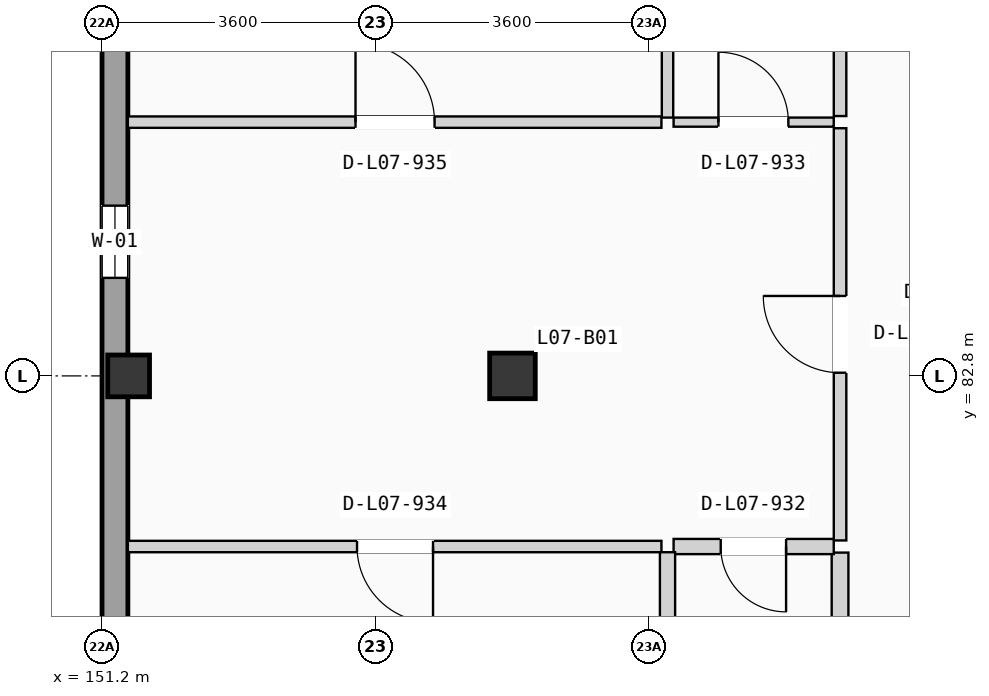
"""IFC4 building model, lengths in metres.
Left out: names, types, materials, properties, quantities, classifications, styles, units other than length and angle.
Written with IfcOpenShell. Run it as: python <this file> out.ifc"""

import sys

from ifc_helpers import new_model, si_unit, direction, frame, frame_2d, origin, origin_2d, place, context, subcontext, project, spatial, rectangle, extrude, element, fill, save


model = new_model("IFC4")
c1 = context("Model", 3, precision=1e-05, world=origin(), true_north=direction((0.0, 1.0)))
c2 = subcontext(c1, "Body", "Model", "MODEL_VIEW")
j1 = project(units=[si_unit("LENGTHUNIT", "METRE"), si_unit("PLANEANGLEUNIT", "RADIAN")], contexts=[c1])
p1 = place(None, origin())
s1 = spatial("IfcSite", under=j1, at=p1, CompositionType="ELEMENT")
p2 = place(p1, origin())
s2 = spatial("IfcBuilding", under=s1, at=p2, CompositionType="ELEMENT")
p3 = place(p2, frame((0.0, 0.0, 24.675)))
s3 = spatial("IfcBuildingStorey", under=s2, at=p3, CompositionType="ELEMENT", Elevation=24.675)
p4 = place(p3, frame((151.55, 82.8, 0.0), z_axis=(0.0, 0.0, 1.0), x_axis=(1.0, 0.0, 0.0)))
e1 = element("IfcColumn", 1, at=p4, inside=s3, PredefinedType="COLUMN", context=c2, shape_type="SweptSolid", body=[
    extrude(rectangle(XDim=0.55, YDim=0.55, at=origin_2d()), origin(), (0.0, 0.0, 1.0), 3.15),
])
p5 = place(p3, frame((156.6, 82.8, 0.0), z_axis=(0.0, 0.0, 1.0), x_axis=(1.0, 0.0, 0.0)))
e2 = element("IfcColumn", 2, at=p5, inside=s3, PredefinedType="COLUMN", context=c2, shape_type="SweptSolid", body=[
    extrude(rectangle(XDim=0.6, YDim=0.6, at=origin_2d()), origin(), (0.0, 0.0, 1.0), 3.15),
])
p6 = place(p3, frame((151.37, 68.74, 0.0), z_axis=(0.0, 0.0, 1.0), x_axis=(0.0, 1.0, 0.0)))
e3 = element("IfcWall", 3, at=p6, inside=s3, PredefinedType="SOLIDWALL", context=c2, shape_type="SweptSolid", body=[
    extrude(rectangle(XDim=49.72, YDim=0.34, at=frame_2d((24.86, 0.0))), origin(), (0.0, 0.0, 1.0), 2.9),
])
p7 = place(p6, frame((15.35, 0.0, 0.85)))
e4 = element("IfcOpeningElement", 4, at=p7, cuts=e3, PredefinedType="OPENING", context=c2, shape_type="SweptSolid", body=[
    extrude(rectangle(XDim=0.95, YDim=1.2, at=frame_2d((0.475, 0.6))), frame((0.0, 0.18, 0.0), z_axis=(0.0, -1.0, 0.0), x_axis=(1.0, 0.0, 0.0)), (0.0, 0.0, 1.0), 0.36),
])
p8 = place(p6, frame((9.023, 0.0, 0.9)))
e5 = element("IfcOpeningElement", 5, at=p8, cuts=e3, PredefinedType="OPENING", context=c2, shape_type="SweptSolid", body=[
    extrude(rectangle(XDim=0.95, YDim=1.2, at=frame_2d((0.475, 0.6))), frame((0.0, 0.18, 0.0), z_axis=(0.0, -1.0, 0.0), x_axis=(1.0, 0.0, 0.0)), (0.0, 0.0, 1.0), 0.36),
])
p9 = place(p6, frame((18.76, 0.0, 0.865)))
e6 = element("IfcOpeningElement", 6, at=p9, cuts=e3, PredefinedType="OPENING", context=c2, shape_type="SweptSolid", body=[
    extrude(rectangle(XDim=0.95, YDim=1.35, at=frame_2d((0.475, 0.675))), frame((0.0, 0.18, 0.0), z_axis=(0.0, -1.0, 0.0), x_axis=(1.0, 0.0, 0.0)), (0.0, 0.0, 1.0), 0.36),
])
p10 = place(p6, frame((31.585, 0.0, 0.715)))
e7 = element("IfcOpeningElement", 7, at=p10, cuts=e3, PredefinedType="OPENING", context=c2, shape_type="SweptSolid", body=[
    extrude(rectangle(XDim=0.95, YDim=1.5, at=frame_2d((0.475, 0.75))), frame((0.0, 0.18, 0.0), z_axis=(0.0, -1.0, 0.0), x_axis=(1.0, 0.0, 0.0)), (0.0, 0.0, 1.0), 0.36),
])
p11 = place(p6, frame((24.687, 0.0, 0.565)))
e8 = element("IfcOpeningElement", 8, at=p11, cuts=e3, PredefinedType="OPENING", context=c2, shape_type="SweptSolid", body=[
    extrude(rectangle(XDim=0.95, YDim=1.65, at=frame_2d((0.475, 0.825))), frame((0.0, 0.18, 0.0), z_axis=(0.0, -1.0, 0.0), x_axis=(1.0, 0.0, 0.0)), (0.0, 0.0, 1.0), 0.36),
])
p12 = place(p6, frame((38.72, 0.0, 0.85)))
e9 = element("IfcOpeningElement", 9, at=p12, cuts=e3, PredefinedType="OPENING", context=c2, shape_type="SweptSolid", body=[
    extrude(rectangle(XDim=0.95, YDim=1.2, at=frame_2d((0.475, 0.6))), frame((0.0, 0.18, 0.0), z_axis=(0.0, -1.0, 0.0), x_axis=(1.0, 0.0, 0.0)), (0.0, 0.0, 1.0), 0.36),
])
p13 = place(p3, frame((160.91, 80.635, 0.0), z_axis=(0.0, 0.0, 1.0), x_axis=(0.0, 1.0, 0.0)))
e10 = element("IfcWall", 10, at=p13, inside=s3, PredefinedType="PARTITIONING", context=c2, shape_type="SweptSolid", body=[
    extrude(rectangle(XDim=5.424, YDim=0.165, at=frame_2d((2.712, 0.0))), origin(), (0.0, 0.0, 1.0), 2.87),
])
p14 = place(p13, frame((2.207, 0.0, 0.0)))
e11 = element("IfcOpeningElement", 11, at=p14, cuts=e10, PredefinedType="OPENING", context=c2, shape_type="SweptSolid", body=[
    extrude(rectangle(XDim=1.01, YDim=2.11, at=frame_2d((0.505, 1.055))), frame((0.0, 0.093, 0.0), z_axis=(0.0, -1.0, 0.0), x_axis=(1.0, 0.0, 0.0)), (0.0, 0.0, 1.0), 0.185),
])
p15 = place(p3, frame((160.91, 76.0, 0.0), z_axis=(0.0, 0.0, 1.0), x_axis=(0.0, 1.0, 0.0)))
e12 = element("IfcWall", 12, at=p15, inside=s3, PredefinedType="PLUMBINGWALL", context=c2, shape_type="SweptSolid", body=[
    extrude(rectangle(XDim=4.475, YDim=0.22, at=frame_2d((2.238, 0.0))), origin(), (0.0, 0.0, 1.0), 2.87),
])
p16 = place(p3, frame((160.91, 86.219, 0.0), z_axis=(0.0, 0.0, 1.0), x_axis=(0.0, 1.0, 0.0)))
e13 = element("IfcWall", 13, at=p16, inside=s3, PredefinedType="PARTITIONING", context=c2, shape_type="SweptSolid", body=[
    extrude(rectangle(XDim=4.475, YDim=0.165, at=frame_2d((2.238, 0.0))), origin(), (0.0, 0.0, 1.0), 2.87),
])
p17 = place(p3, frame((158.72, 80.555, 0.0), z_axis=(0.0, 0.0, 1.0), x_axis=(1.0, 0.0, 0.0)))
e14 = element("IfcWall", 14, at=p17, inside=s3, PredefinedType="PLUMBINGWALL", context=c2, shape_type="SweptSolid", body=[
    extrude(rectangle(XDim=2.107, YDim=0.2, at=frame_2d((1.053, 0.0))), origin(), (0.0, 0.0, 1.0), 2.87),
])
p18 = place(p17, frame((0.62, 0.0, 0.0)))
e15 = element("IfcOpeningElement", 15, at=p18, cuts=e14, PredefinedType="OPENING", context=c2, shape_type="SweptSolid", body=[
    extrude(rectangle(XDim=0.86, YDim=2.0, at=frame_2d((0.43, 1.0))), frame((0.0, 0.11, 0.0), z_axis=(0.0, -1.0, 0.0), x_axis=(1.0, 0.0, 0.0)), (0.0, 0.0, 1.0), 0.22),
])
p19 = place(p3, frame((158.72, 86.139, 0.0), z_axis=(0.0, 0.0, 1.0), x_axis=(1.0, 0.0, 0.0)))
e16 = element("IfcWall", 16, at=p19, inside=s3, PredefinedType="PARTITIONING", context=c2, shape_type="SweptSolid", body=[
    extrude(rectangle(XDim=2.107, YDim=0.12, at=frame_2d((1.053, 0.0))), origin(), (0.0, 0.0, 1.0), 2.87),
])
p20 = place(p19, frame((0.59, 0.0, 0.0)))
e17 = element("IfcOpeningElement", 17, at=p20, cuts=e16, PredefinedType="OPENING", context=c2, shape_type="SweptSolid", body=[
    extrude(rectangle(XDim=0.92, YDim=2.02, at=frame_2d((0.46, 1.01))), frame((0.0, 0.07, 0.0), z_axis=(0.0, -1.0, 0.0), x_axis=(1.0, 0.0, 0.0)), (0.0, 0.0, 1.0), 0.14),
])
p21 = place(p3, frame((151.54, 80.555, 0.0), z_axis=(0.0, 0.0, 1.0), x_axis=(1.0, 0.0, 0.0)))
e18 = element("IfcWall", 18, at=p21, inside=s3, PredefinedType="PARTITIONING", context=c2, shape_type="SweptSolid", body=[
    extrude(rectangle(XDim=7.02, YDim=0.15, at=frame_2d((3.51, 0.0))), origin(), (0.0, 0.0, 1.0), 2.87),
])
p22 = place(p21, frame((3.015, 0.0, 0.0)))
e19 = element("IfcOpeningElement", 19, at=p22, cuts=e18, PredefinedType="OPENING", context=c2, shape_type="SweptSolid", body=[
    extrude(rectangle(XDim=1.0, YDim=2.06, at=frame_2d((0.5, 1.03))), frame((0.0, 0.085, 0.0), z_axis=(0.0, -1.0, 0.0), x_axis=(1.0, 0.0, 0.0)), (0.0, 0.0, 1.0), 0.17),
])
p23 = place(p3, frame((151.54, 86.139, 0.0), z_axis=(0.0, 0.0, 1.0), x_axis=(1.0, 0.0, 0.0)))
e20 = element("IfcWall", 20, at=p23, inside=s3, PredefinedType="PARTITIONING", context=c2, shape_type="SweptSolid", body=[
    extrude(rectangle(XDim=7.02, YDim=0.15, at=frame_2d((3.51, 0.0))), origin(), (0.0, 0.0, 1.0), 2.87),
])
p24 = place(p23, frame((2.995, 0.0, 0.0)))
e21 = element("IfcOpeningElement", 21, at=p24, cuts=e20, PredefinedType="OPENING", context=c2, shape_type="SweptSolid", body=[
    extrude(rectangle(XDim=1.04, YDim=2.08, at=frame_2d((0.52, 1.04))), frame((0.0, 0.085, 0.0), z_axis=(0.0, -1.0, 0.0), x_axis=(1.0, 0.0, 0.0)), (0.0, 0.0, 1.0), 0.17),
])
p25 = place(p3, frame((158.64, 76.0, 0.0), z_axis=(0.0, 0.0, 1.0), x_axis=(0.0, 1.0, 0.0)))
e22 = element("IfcWall", 22, at=p25, inside=s3, PredefinedType="PLUMBINGWALL", context=c2, shape_type="SweptSolid", body=[
    extrude(rectangle(XDim=4.48, YDim=0.2, at=frame_2d((2.24, 0.0))), origin(), (0.0, 0.0, 1.0), 2.87),
])
p26 = place(p3, frame((158.64, 86.199, 0.0), z_axis=(0.0, 0.0, 1.0), x_axis=(0.0, 1.0, 0.0)))
e23 = element("IfcWall", 23, at=p26, inside=s3, PredefinedType="PARTITIONING", context=c2, shape_type="SweptSolid", body=[
    extrude(rectangle(XDim=4.495, YDim=0.15, at=frame_2d((2.248, 0.0))), origin(), (0.0, 0.0, 1.0), 2.87),
])
p27 = place(p7, origin())
e24 = element("IfcWindow", 24, at=p27, inside=s3, PartitioningType="SINGLE_PANEL", PredefinedType="WINDOW", context=c2, shape_type="SweptSolid", body=[
    extrude(rectangle(XDim=0.95, YDim=1.2, at=frame_2d((0.475, 0.6))), frame((0.0, 0.03, 0.0), z_axis=(0.0, -1.0, 0.0), x_axis=(1.0, 0.0, 0.0)), (0.0, 0.0, 1.0), 0.06),
])
fill(e4, e24)
p28 = place(p14, origin())
e25 = element("IfcDoor", 25, at=p28, inside=s3, OperationType="SINGLE_SWING_RIGHT", PredefinedType="DOOR", context=c2, shape_type="SweptSolid", body=[
    extrude(rectangle(XDim=1.01, YDim=2.11, at=frame_2d((0.505, 1.055))), frame((0.0, 0.025, 0.0), z_axis=(0.0, -1.0, 0.0), x_axis=(1.0, 0.0, 0.0)), (0.0, 0.0, 1.0), 0.05),
])
fill(e11, e25)
p29 = place(p18, frame((0.86, 0.0, 0.0), z_axis=(0.0, 0.0, 1.0), x_axis=(-1.0, 0.0, 0.0)))
e26 = element("IfcDoor", 26, at=p29, inside=s3, OperationType="SINGLE_SWING_RIGHT", PredefinedType="DOOR", context=c2, shape_type="SweptSolid", body=[
    extrude(rectangle(XDim=0.86, YDim=2.0, at=frame_2d((0.43, 1.0))), frame((0.0, 0.025, 0.0), z_axis=(0.0, -1.0, 0.0), x_axis=(1.0, 0.0, 0.0)), (0.0, 0.0, 1.0), 0.05),
])
fill(e15, e26)
p30 = place(p20, origin())
e27 = element("IfcDoor", 27, at=p30, inside=s3, OperationType="SINGLE_SWING_LEFT", PredefinedType="DOOR", context=c2, shape_type="SweptSolid", body=[
    extrude(rectangle(XDim=0.92, YDim=2.02, at=frame_2d((0.46, 1.01))), frame((0.0, 0.025, 0.0), z_axis=(0.0, -1.0, 0.0), x_axis=(1.0, 0.0, 0.0)), (0.0, 0.0, 1.0), 0.05),
])
fill(e17, e27)
p31 = place(p22, frame((1.0, 0.0, 0.0), z_axis=(0.0, 0.0, 1.0), x_axis=(-1.0, 0.0, 0.0)))
e28 = element("IfcDoor", 28, at=p31, inside=s3, OperationType="SINGLE_SWING_RIGHT", PredefinedType="DOOR", context=c2, shape_type="SweptSolid", body=[
    extrude(rectangle(XDim=1.0, YDim=2.06, at=frame_2d((0.5, 1.03))), frame((0.0, 0.025, 0.0), z_axis=(0.0, -1.0, 0.0), x_axis=(1.0, 0.0, 0.0)), (0.0, 0.0, 1.0), 0.05),
])
fill(e19, e28)
p32 = place(p24, origin())
e29 = element("IfcDoor", 29, at=p32, inside=s3, OperationType="SINGLE_SWING_LEFT", PredefinedType="DOOR", context=c2, shape_type="SweptSolid", body=[
    extrude(rectangle(XDim=1.04, YDim=2.08, at=frame_2d((0.52, 1.04))), frame((0.0, 0.025, 0.0), z_axis=(0.0, -1.0, 0.0), x_axis=(1.0, 0.0, 0.0)), (0.0, 0.0, 1.0), 0.05),
])
fill(e21, e29)
save(model, sys.argv[1])
